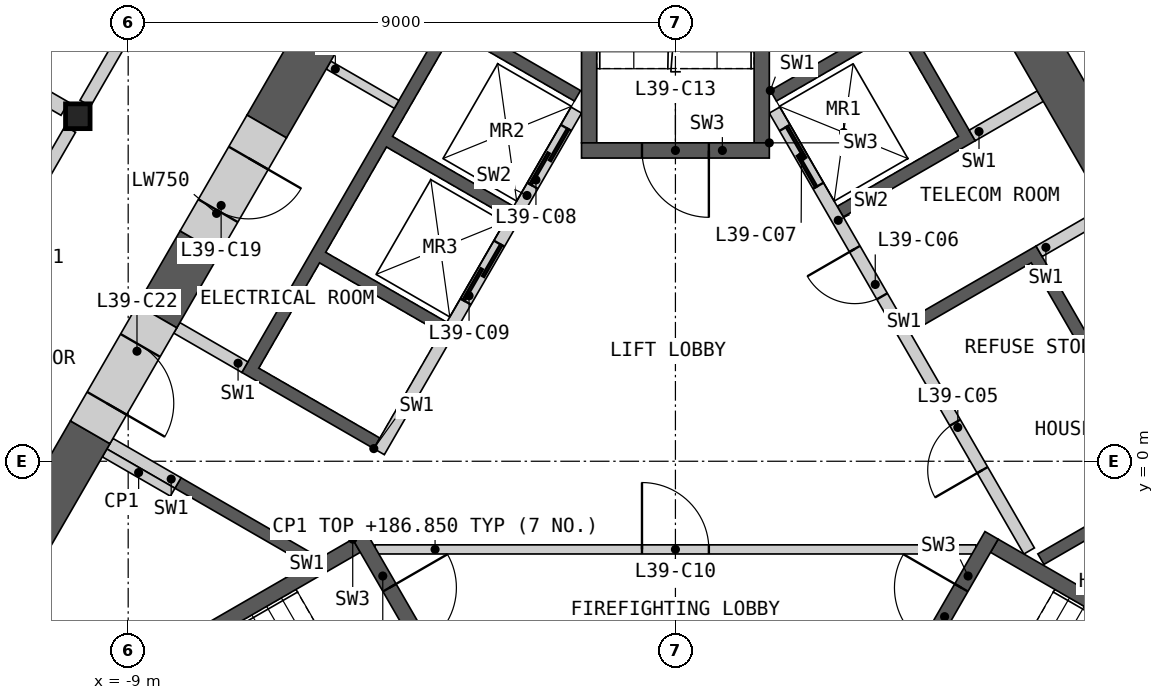
"""IFC4 building model, lengths in metres.
Left out: names, types, materials, properties, quantities, classifications, styles, units other than length and angle.
Written with IfcOpenShell. Run it as: python <this file> out.ifc"""

import sys

from ifc_helpers import new_model, si_unit, direction, frame, frame_2d, origin, origin_2d, place, context, subcontext, project, spatial, polyline, rectangle, i_section, outline, extrude, element, fill, save


model = new_model("IFC4")
c1 = context("Model", 3, precision=1e-05, world=origin(), true_north=direction((0.0, 1.0)))
c2 = subcontext(c1, "Body", "Model", "MODEL_VIEW")
j1 = project(units=[si_unit("LENGTHUNIT", "METRE"), si_unit("PLANEANGLEUNIT", "RADIAN")], contexts=[c1])
p1 = place(None, origin())
s1 = spatial("IfcSite", under=j1, at=p1, CompositionType="ELEMENT")
p2 = place(p1, origin())
s2 = spatial("IfcBuilding", under=s1, at=p2, CompositionType="ELEMENT")
p3 = place(p2, frame((0.0, 0.0, 183.6)))
s3 = spatial("IfcBuildingStorey", under=s2, at=p3, CompositionType="ELEMENT", Elevation=183.6)
p4 = place(p3, frame((-9.828, 5.675, 0.0), z_axis=(0.0, 0.0, 1.0), x_axis=(1.0, 0.0, 0.0)))
e1 = element("IfcColumn", 1, at=p4, inside=s3, PredefinedType="COLUMN", context=c2, shape_type="SweptSolid", body=[
    extrude(i_section(OverallWidth=0.404, OverallDepth=0.407, WebThickness=0.027, FlangeThickness=0.044, at=origin_2d()), origin(), (0.0, 0.0, 1.0), 3.6),
])
p5 = place(p3, origin())
e2 = element("IfcWall", 2, at=p5, inside=s3, PredefinedType="SHEAR", context=c2, shape_type="SweptSolid", body=[
    extrude(outline(polyline([(1.561, 6.097), (3.731, 7.35), (4.931, 5.272), (2.76, 4.019), (2.66, 4.192), (4.652, 5.342), (3.652, 7.074), (1.66, 5.924), (1.561, 6.097)])), origin(), (0.0, 0.0, 1.0), 3.25),
])
p6 = place(p3, origin())
e3 = element("IfcWall", 3, at=p6, inside=s3, PredefinedType="SHEAR", context=c2, shape_type="SweptSolid", body=[
    extrude(outline(polyline([(3.76, 2.287), (5.931, 3.54), (8.231, -0.444), (6.061, -1.697), (5.96, -1.524), (7.952, -0.374), (5.852, 3.263), (3.861, 2.113), (3.76, 2.287)])), origin(), (0.0, 0.0, 1.0), 3.25),
])
p7 = place(p3, frame((5.817, -1.476, 0.0), z_axis=(0.0, 0.0, 1.0), x_axis=(-0.500002616675, 0.866023893041, 0.0)))
e4 = element("IfcWall", 4, at=p7, inside=s3, PredefinedType="SOLIDWALL", context=c2, shape_type="SweptSolid", body=[
    extrude(rectangle(XDim=8.373, YDim=0.2, at=frame_2d((4.187, 0.0))), origin(), (0.0, 0.0, 1.0), 3.25),
])
p8 = place(p7, frame((1.537, 0.0, 0.0)))
e5 = element("IfcOpeningElement", 5, at=p8, cuts=e4, PredefinedType="OPENING", context=c2, shape_type="SweptSolid", body=[
    extrude(rectangle(XDim=0.9, YDim=2.1, at=frame_2d((0.45, 1.05))), frame((0.0, 0.11, 0.0), z_axis=(0.0, -1.0, 0.0), x_axis=(1.0, 0.0, 0.0)), (0.0, 0.0, 1.0), 0.22),
])
p9 = place(p7, frame((4.837, 0.0, 0.0)))
e6 = element("IfcOpeningElement", 6, at=p9, cuts=e4, PredefinedType="OPENING", context=c2, shape_type="SweptSolid", body=[
    extrude(rectangle(XDim=0.9, YDim=2.1, at=frame_2d((0.45, 1.05))), frame((0.0, 0.11, 0.0), z_axis=(0.0, -1.0, 0.0), x_axis=(1.0, 0.0, 0.0)), (0.0, 0.0, 1.0), 0.22),
])
p10 = place(p7, frame((6.937, 0.0, 0.0)))
e7 = element("IfcOpeningElement", 7, at=p10, cuts=e4, PredefinedType="OPENING", context=c2, shape_type="SweptSolid", body=[
    extrude(rectangle(XDim=1.1, YDim=2.1, at=frame_2d((0.55, 1.05))), frame((0.0, 0.11, 0.0), z_axis=(0.0, -1.0, 0.0), x_axis=(1.0, 0.0, 0.0)), (0.0, 0.0, 1.0), 0.22),
])
p11 = place(p3, frame((5.981, 3.453, 0.0), z_axis=(0.0, 0.0, 1.0), x_axis=(0.865968639725, 0.500098305348, 0.0)))
e8 = element("IfcWall", 8, at=p11, inside=s3, PredefinedType="SHEAR", context=c2, shape_type="SweptSolid", body=[
    extrude(rectangle(XDim=1.293, YDim=0.2, at=frame_2d((0.646, 0.0))), origin(), (0.0, 0.0, 1.0), 3.25),
])
p12 = place(p3, frame((4.881, 5.358, 0.0), z_axis=(0.0, 0.0, 1.0), x_axis=(0.866084958089, 0.499896834728, 0.0)))
e9 = element("IfcWall", 9, at=p12, inside=s3, PredefinedType="SHEAR", context=c2, shape_type="SweptSolid", body=[
    extrude(rectangle(XDim=1.293, YDim=0.2, at=frame_2d((0.646, 0.0))), origin(), (0.0, 0.0, 1.0), 3.25),
])
p13 = place(p3, origin())
e10 = element("IfcWall", 10, at=p13, inside=s3, PredefinedType="SHEAR", context=c2, shape_type="SweptSolid", body=[
    extrude(outline(polyline([(-6.061, -1.697), (-8.231, -0.444), (-8.131, -0.271), (-5.96, -1.524), (-6.061, -1.697)])), origin(), (0.0, 0.0, 1.0), 3.25),
])
p14 = place(p3, origin())
e11 = element("IfcWall", 11, at=p14, inside=s3, PredefinedType="SHEAR", context=c2, shape_type="SweptSolid", body=[
    extrude(outline(polyline([(-4.96, 0.208), (-7.131, 1.461), (-3.731, 7.35), (-1.561, 6.097), (-1.66, 5.924), (-3.652, 7.074), (-4.652, 5.342), (-2.66, 4.192), (-2.76, 4.019), (-4.752, 5.169), (-5.752, 3.437), (-3.76, 2.287), (-3.861, 2.113), (-5.852, 3.263), (-6.852, 1.531), (-4.861, 0.381), (-4.96, 0.208)])), origin(), (0.0, 0.0, 1.0), 3.25),
])
p15 = place(p3, frame((-1.631, 5.776, 0.0), z_axis=(0.0, 0.0, 1.0), x_axis=(-0.499992876559, -0.866029516466, 0.0)))
e12 = element("IfcWall", 12, at=p15, inside=s3, PredefinedType="SOLIDWALL", context=c2, shape_type="SweptSolid", body=[
    extrude(rectangle(XDim=6.486, YDim=0.2, at=frame_2d((3.243, 0.0))), origin(), (0.0, 0.0, 1.0), 3.25),
])
p16 = place(p15, frame((0.337, 0.0, 0.0)))
e13 = element("IfcOpeningElement", 13, at=p16, cuts=e12, PredefinedType="OPENING", context=c2, shape_type="SweptSolid", body=[
    extrude(rectangle(XDim=1.1, YDim=2.1, at=frame_2d((0.55, 1.05))), frame((0.0, 0.11, 0.0), z_axis=(0.0, -1.0, 0.0), x_axis=(1.0, 0.0, 0.0)), (0.0, 0.0, 1.0), 0.22),
])
p17 = place(p15, frame((2.537, 0.0, 0.0)))
e14 = element("IfcOpeningElement", 14, at=p17, cuts=e12, PredefinedType="OPENING", context=c2, shape_type="SweptSolid", body=[
    extrude(rectangle(XDim=1.1, YDim=2.1, at=frame_2d((0.55, 1.05))), frame((0.0, 0.11, 0.0), z_axis=(0.0, -1.0, 0.0), x_axis=(1.0, 0.0, 0.0)), (0.0, 0.0, 1.0), 0.22),
])
for number, where, z_axis, x_axis in (
    (15, (-7.081, 1.548, 0.0), (0.0, 0.0, 1.0), (-0.866, 0.5, 0.0)),
    (16, (-8.181, -0.357, 0.0), (0.0, 0.0, 1.0), (-0.866, 0.5, 0.0)),
):
    element("IfcWall", number, at=place(p3, frame(where, z_axis=z_axis, x_axis=x_axis)), inside=s3, PredefinedType="SHEAR", context=c2, shape_type="SweptSolid", body=[
        extrude(rectangle(XDim=1.293, YDim=0.2, at=frame_2d((0.646, 0.0))), origin(), (0.0, 0.0, 1.0), 3.25),
    ])
p18 = place(p3, frame((-4.941, -1.45, 0.0), z_axis=(0.0, 0.0, 1.0), x_axis=(1.0, 0.0, 0.0)))
e17 = element("IfcWall", 17, at=p18, inside=s3, PredefinedType="PARTITIONING", context=c2, shape_type="SweptSolid", body=[
    extrude(rectangle(XDim=9.882, YDim=0.15, at=frame_2d((4.941, 0.0))), origin(), (0.0, 0.0, 1.0), 3.25),
])
p19 = place(p18, frame((4.391, 0.0, 0.0)))
e18 = element("IfcOpeningElement", 18, at=p19, cuts=e17, PredefinedType="OPENING", context=c2, shape_type="SweptSolid", body=[
    extrude(rectangle(XDim=1.1, YDim=2.1, at=frame_2d((0.55, 1.05))), frame((0.0, 0.085, 0.0), z_axis=(0.0, -1.0, 0.0), x_axis=(1.0, 0.0, 0.0)), (0.0, 0.0, 1.0), 0.17),
])
p20 = place(p3, origin())
e19 = element("IfcWall", 19, at=p20, inside=s3, PredefinedType="SHEAR", context=c2, shape_type="SweptSolid", body=[
    extrude(outline(polyline([(-5.307, -1.281), (-10.374, -4.206), (-10.032, -4.298), (-5.182, -1.498), (-5.307, -1.281)])), origin(), (0.0, 0.0, 1.0), 3.25),
])
p21 = place(p3, frame((-5.199, -1.219, 0.0), z_axis=(0.0, 0.0, 1.0), x_axis=(0.499982516597, -0.866035497597, 0.0)))
e20 = element("IfcWall", 20, at=p21, inside=s3, PredefinedType="SHEAR", context=c2, shape_type="SweptSolid", body=[
    extrude(rectangle(XDim=3.088, YDim=0.25, at=frame_2d((1.544, 0.0))), origin(), (0.0, 0.0, 1.0), 3.25),
])
p22 = place(p21, frame((0.994, 0.0, 0.0)))
e21 = element("IfcOpeningElement", 21, at=p22, cuts=e20, PredefinedType="OPENING", context=c2, shape_type="SweptSolid", body=[
    extrude(rectangle(XDim=1.1, YDim=2.1, at=frame_2d((0.55, 1.05))), frame((0.0, 0.135, 0.0), z_axis=(0.0, -1.0, 0.0), x_axis=(1.0, 0.0, 0.0)), (0.0, 0.0, 1.0), 0.27),
])
p23 = place(p3, origin())
e22 = element("IfcWall", 22, at=p23, inside=s3, PredefinedType="SHEAR", context=c2, shape_type="SweptSolid", body=[
    extrude(outline(polyline([(10.032, -4.298), (10.374, -4.206), (5.307, -1.281), (5.182, -1.498), (10.032, -4.298)])), origin(), (0.0, 0.0, 1.0), 3.25),
])
p24 = place(p3, frame((3.655, -3.893, 0.0), z_axis=(0.0, 0.0, 1.0), x_axis=(0.499982516597, 0.866035497597, 0.0)))
e23 = element("IfcWall", 23, at=p24, inside=s3, PredefinedType="SHEAR", context=c2, shape_type="SweptSolid", body=[
    extrude(rectangle(XDim=3.088, YDim=0.25, at=frame_2d((1.544, 0.0))), origin(), (0.0, 0.0, 1.0), 3.25),
])
p25 = place(p24, frame((0.994, 0.0, 0.0)))
e24 = element("IfcOpeningElement", 24, at=p25, cuts=e23, PredefinedType="OPENING", context=c2, shape_type="SweptSolid", body=[
    extrude(rectangle(XDim=1.1, YDim=2.1, at=frame_2d((0.55, 1.05))), frame((0.0, 0.135, 0.0), z_axis=(0.0, -1.0, 0.0), x_axis=(1.0, 0.0, 0.0)), (0.0, 0.0, 1.0), 0.27),
])
p26 = place(p3, origin())
e25 = element("IfcWall", 25, at=p26, inside=s3, PredefinedType="SHEAR", context=c2, shape_type="SweptSolid", body=[
    extrude(outline(polyline([(1.544, 5.237), (1.544, 11.087), (1.294, 10.837), (1.294, 5.237), (1.544, 5.237)])), origin(), (0.0, 0.0, 1.0), 3.25),
])
p27 = place(p3, origin())
e26 = element("IfcWall", 26, at=p27, inside=s3, PredefinedType="SHEAR", context=c2, shape_type="SweptSolid", body=[
    extrude(outline(polyline([(-1.294, 10.837), (-1.544, 11.087), (-1.544, 5.237), (-1.294, 5.237), (-1.294, 10.837)])), origin(), (0.0, 0.0, 1.0), 3.25),
])
p28 = place(p3, frame((1.544, 5.112, 0.0), z_axis=(0.0, 0.0, 1.0), x_axis=(-1.0, 0.0, 0.0)))
e27 = element("IfcWall", 27, at=p28, inside=s3, PredefinedType="SHEAR", context=c2, shape_type="SweptSolid", body=[
    extrude(rectangle(XDim=3.088, YDim=0.25, at=frame_2d((1.544, 0.0))), origin(), (0.0, 0.0, 1.0), 3.25),
])
p29 = place(p28, frame((0.994, 0.0, 0.0)))
e28 = element("IfcOpeningElement", 28, at=p29, cuts=e27, PredefinedType="OPENING", context=c2, shape_type="SweptSolid", body=[
    extrude(rectangle(XDim=1.1, YDim=2.1, at=frame_2d((0.55, 1.05))), frame((0.0, 0.135, 0.0), z_axis=(0.0, -1.0, 0.0), x_axis=(1.0, 0.0, 0.0)), (0.0, 0.0, 1.0), 0.27),
])
for number, where, z_axis, x_axis in (
    (29, (-8.268, -0.509, 0.0), (0.0, 0.0, 1.0), (-0.866, 0.5, 0.0)),
    (30, (-5.705, 6.516, 0.0), (0.0, 0.0, 1.0), (0.866, -0.5, 0.0)),
):
    element("IfcWall", number, at=place(p3, frame(where, z_axis=z_axis, x_axis=x_axis)), inside=s3, PredefinedType="PARTITIONING", context=c2, shape_type="SweptSolid", body=[
        extrude(rectangle(XDim=1.293, YDim=0.15, at=frame_2d((0.646, 0.0))), origin(), (0.0, 0.0, 1.0), 3.25),
    ])
p30 = place(p3, frame((7.964, 3.354, 0.0), z_axis=(0.0, 0.0, 1.0), x_axis=(-0.50002928721, 0.866008494146, 0.0)))
e31 = element("IfcWall", 31, at=p30, inside=s3, PredefinedType="SHEAR", context=c2, shape_type="SweptSolid", body=[
    extrude(rectangle(XDim=6.405, YDim=0.75, at=frame_2d((3.203, 0.0))), origin(), (0.0, 0.0, 1.0), 3.25),
])
p31 = place(p3, frame((-9.625, 0.477, 0.0), z_axis=(0.0, 0.0, 1.0), x_axis=(-0.499986234705, -0.866033351035, 0.0)))
e32 = element("IfcWall", 32, at=p31, inside=s3, PredefinedType="SHEAR", context=c2, shape_type="SweptSolid", body=[
    extrude(rectangle(XDim=9.801, YDim=0.75, at=frame_2d((4.9, 0.0))), origin(), (0.0, 0.0, 1.0), 3.25),
])
p32 = place(p3, frame((-2.622, 12.606, 0.0), z_axis=(0.0, 0.0, 1.0), x_axis=(-0.500014611105, -0.866016967894, 0.0)))
e33 = element("IfcWall", 33, at=p32, inside=s3, PredefinedType="SHEAR", context=c2, shape_type="SweptSolid", body=[
    extrude(rectangle(XDim=8.198, YDim=0.75, at=frame_2d((4.099, 0.0))), origin(), (0.0, 0.0, 1.0), 3.25),
])
p33 = place(p3, frame((-7.821, 3.601, 0.0), z_axis=(0.0, 0.0, 1.0), x_axis=(-0.49996263964, -0.866046972724, 0.0)))
e34 = element("IfcWall", 34, at=p33, inside=s3, PredefinedType="SHEAR", context=c2, shape_type="SweptSolid", body=[
    extrude(rectangle(XDim=1.408, YDim=0.75, at=frame_2d((0.704, 0.0))), origin(), (0.0, 0.0, 1.0), 3.25),
])
p34 = place(p3, frame((-6.721, 5.506, 0.0), z_axis=(0.0, 0.0, 1.0), x_axis=(-0.499946605688, -0.86605622881, 0.0)))
e35 = element("IfcWall", 35, at=p34, inside=s3, PredefinedType="SHEAR", context=c2, shape_type="SweptSolid", body=[
    extrude(rectangle(XDim=2.2, YDim=0.75, at=frame_2d((1.1, 0.0))), origin(), (0.0, 0.0, 1.0), 3.25),
])
p35 = place(p34, frame((0.6, 0.0, 0.0)))
e36 = element("IfcOpeningElement", 36, at=p35, cuts=e35, PredefinedType="OPENING", context=c2, shape_type="SweptSolid", body=[
    extrude(rectangle(XDim=1.0, YDim=2.1, at=frame_2d((0.5, 1.05))), frame((0.0, 0.385, 0.0), z_axis=(0.0, -1.0, 0.0), x_axis=(1.0, 0.0, 0.0)), (0.0, 0.0, 1.0), 0.77),
])
p36 = place(p3, frame((-8.525, 2.382, 0.0), z_axis=(0.0, 0.0, 1.0), x_axis=(-0.500077893725, -0.86598042715, 0.0)))
e37 = element("IfcWall", 37, at=p36, inside=s3, PredefinedType="SHEAR", context=c2, shape_type="SweptSolid", body=[
    extrude(rectangle(XDim=2.2, YDim=0.75, at=frame_2d((1.1, 0.0))), origin(), (0.0, 0.0, 1.0), 3.25),
])
p37 = place(p36, frame((0.55, 0.0, 0.0)))
e38 = element("IfcOpeningElement", 38, at=p37, cuts=e37, PredefinedType="OPENING", context=c2, shape_type="SweptSolid", body=[
    extrude(rectangle(XDim=1.1, YDim=2.1, at=frame_2d((0.55, 1.05))), frame((0.0, 0.385, 0.0), z_axis=(0.0, -1.0, 0.0), x_axis=(1.0, 0.0, 0.0)), (0.0, 0.0, 1.0), 0.77),
])
p38 = place(p3, frame((5.377, 19.385, 0.0), z_axis=(0.0, 0.0, 1.0), x_axis=(0.500000757641, -0.86602496636, 0.0)))
e39 = element("IfcWall", 39, at=p38, inside=s3, PredefinedType="PARTITIONING", context=c2, shape_type="SweptSolid", body=[
    extrude(rectangle(XDim=28.198, YDim=0.2, at=frame_2d((14.099, 0.0))), origin(), (0.0, 0.0, 1.0), 3.25),
])
p39 = place(p38, frame((22.735, 0.0, 0.0)))
e40 = element("IfcOpeningElement", 40, at=p39, cuts=e39, PredefinedType="OPENING", context=c2, shape_type="SweptSolid", body=[
    extrude(rectangle(XDim=1.8, YDim=2.1, at=frame_2d((0.9, 1.05))), frame((0.0, 0.11, 0.0), z_axis=(0.0, -1.0, 0.0), x_axis=(1.0, 0.0, 0.0)), (0.0, 0.0, 1.0), 0.22),
])
p40 = place(p38, frame((14.402, 0.0, 0.0)))
e41 = element("IfcOpeningElement", 41, at=p40, cuts=e39, PredefinedType="OPENING", context=c2, shape_type="SweptSolid", body=[
    extrude(rectangle(XDim=1.0, YDim=2.1, at=frame_2d((0.5, 1.05))), frame((0.0, 0.11, 0.0), z_axis=(0.0, -1.0, 0.0), x_axis=(1.0, 0.0, 0.0)), (0.0, 0.0, 1.0), 0.22),
])
p41 = place(p38, frame((12.796, 0.0, 0.0)))
e42 = element("IfcOpeningElement", 42, at=p41, cuts=e39, PredefinedType="OPENING", context=c2, shape_type="SweptSolid", body=[
    extrude(rectangle(XDim=1.0, YDim=2.1, at=frame_2d((0.5, 1.05))), frame((0.0, 0.11, 0.0), z_axis=(0.0, -1.0, 0.0), x_axis=(1.0, 0.0, 0.0)), (0.0, 0.0, 1.0), 0.22),
])
p42 = place(p38, frame((4.164, 0.0, 0.0)))
e43 = element("IfcOpeningElement", 43, at=p42, cuts=e39, PredefinedType="OPENING", context=c2, shape_type="SweptSolid", body=[
    extrude(rectangle(XDim=1.0, YDim=2.1, at=frame_2d((0.5, 1.05))), frame((0.0, 0.11, 0.0), z_axis=(0.0, -1.0, 0.0), x_axis=(1.0, 0.0, 0.0)), (0.0, 0.0, 1.0), 0.22),
])
p43 = place(p38, frame((1.452, 0.0, 0.0)))
e44 = element("IfcOpeningElement", 44, at=p43, cuts=e39, PredefinedType="OPENING", context=c2, shape_type="SweptSolid", body=[
    extrude(rectangle(XDim=0.95, YDim=2.1, at=frame_2d((0.475, 1.05))), frame((0.0, 0.11, 0.0), z_axis=(0.0, -1.0, 0.0), x_axis=(1.0, 0.0, 0.0)), (0.0, 0.0, 1.0), 0.22),
])
p44 = place(p3, frame((-21.0, 12.124, 0.0), z_axis=(0.0, 0.0, 1.0), x_axis=(0.866025883649, -0.499999168849, 0.0)))
e45 = element("IfcWall", 45, at=p44, inside=s3, PredefinedType="PARTITIONING", context=c2, shape_type="SweptSolid", body=[
    extrude(rectangle(XDim=12.652, YDim=0.25, at=frame_2d((6.326, 0.0))), origin(), (0.0, 0.0, 1.0), 2.404),
])
p45 = place(p3, frame((-9.705, 5.888, 0.0), z_axis=(0.0, 0.0, 1.0), x_axis=(0.50000393355, 0.866023132736, 0.0)))
e46 = element("IfcWall", 46, at=p45, inside=s3, PredefinedType="PARTITIONING", context=c2, shape_type="SweptSolid", body=[
    extrude(rectangle(XDim=9.335, YDim=0.2, at=frame_2d((4.667, 0.0))), origin(), (0.0, 0.0, 1.0), 3.25),
])
p46 = place(p45, frame((5.172, 0.0, 0.0)))
e47 = element("IfcOpeningElement", 47, at=p46, cuts=e46, PredefinedType="OPENING", context=c2, shape_type="SweptSolid", body=[
    extrude(rectangle(XDim=1.0, YDim=2.1, at=frame_2d((0.5, 1.05))), frame((0.0, 0.11, 0.0), z_axis=(0.0, -1.0, 0.0), x_axis=(1.0, 0.0, 0.0)), (0.0, 0.0, 1.0), 0.22),
])
p47 = place(p45, frame((3.565, 0.0, 0.0)))
e48 = element("IfcOpeningElement", 48, at=p47, cuts=e46, PredefinedType="OPENING", context=c2, shape_type="SweptSolid", body=[
    extrude(rectangle(XDim=1.0, YDim=2.1, at=frame_2d((0.5, 1.05))), frame((0.0, 0.11, 0.0), z_axis=(0.0, -1.0, 0.0), x_axis=(1.0, 0.0, 0.0)), (0.0, 0.0, 1.0), 0.22),
])
p48 = place(p3, frame((-14.619, -2.624, 0.0), z_axis=(0.0, 0.0, 1.0), x_axis=(0.50000393355, 0.866023132736, 0.0)))
e49 = element("IfcWall", 49, at=p48, inside=s3, PredefinedType="PARTITIONING", context=c2, shape_type="SweptSolid", body=[
    extrude(rectangle(XDim=9.335, YDim=0.2, at=frame_2d((4.667, 0.0))), origin(), (0.0, 0.0, 1.0), 3.25),
])
p49 = place(p48, frame((4.77, 0.0, 0.0)))
e50 = element("IfcOpeningElement", 50, at=p49, cuts=e49, PredefinedType="OPENING", context=c2, shape_type="SweptSolid", body=[
    extrude(rectangle(XDim=1.0, YDim=2.1, at=frame_2d((0.5, 1.05))), frame((0.0, 0.11, 0.0), z_axis=(0.0, -1.0, 0.0), x_axis=(1.0, 0.0, 0.0)), (0.0, 0.0, 1.0), 0.22),
])
p50 = place(p48, frame((3.163, 0.0, 0.0)))
e51 = element("IfcOpeningElement", 51, at=p50, cuts=e49, PredefinedType="OPENING", context=c2, shape_type="SweptSolid", body=[
    extrude(rectangle(XDim=1.0, YDim=2.1, at=frame_2d((0.5, 1.05))), frame((0.0, 0.11, 0.0), z_axis=(0.0, -1.0, 0.0), x_axis=(1.0, 0.0, 0.0)), (0.0, 0.0, 1.0), 0.22),
])
p51 = place(p8, origin())
e52 = element("IfcDoor", 52, at=p51, inside=s3, OperationType="SINGLE_SWING_LEFT", PredefinedType="DOOR", context=c2, shape_type="SweptSolid", body=[
    extrude(rectangle(XDim=0.9, YDim=2.1, at=frame_2d((0.45, 1.05))), frame((0.0, 0.025, 0.0), z_axis=(0.0, -1.0, 0.0), x_axis=(1.0, 0.0, 0.0)), (0.0, 0.0, 1.0), 0.05),
])
fill(e5, e52)
p52 = place(p9, origin())
e53 = element("IfcDoor", 53, at=p52, inside=s3, OperationType="SINGLE_SWING_RIGHT", PredefinedType="DOOR", context=c2, shape_type="SweptSolid", body=[
    extrude(rectangle(XDim=0.9, YDim=2.1, at=frame_2d((0.45, 1.05))), frame((0.0, 0.025, 0.0), z_axis=(0.0, -1.0, 0.0), x_axis=(1.0, 0.0, 0.0)), (0.0, 0.0, 1.0), 0.05),
])
fill(e6, e53)
p53 = place(p10, origin())
e54 = element("IfcDoor", 54, at=p53, inside=s3, OperationType="SLIDING_TO_LEFT", PredefinedType="DOOR", context=c2, shape_type="SweptSolid", body=[
    extrude(rectangle(XDim=1.1, YDim=2.1, at=frame_2d((0.55, 1.05))), frame((0.0, 0.025, 0.0), z_axis=(0.0, -1.0, 0.0), x_axis=(1.0, 0.0, 0.0)), (0.0, 0.0, 1.0), 0.05),
])
fill(e7, e54)
p54 = place(p16, origin())
e55 = element("IfcDoor", 55, at=p54, inside=s3, OperationType="SLIDING_TO_LEFT", PredefinedType="DOOR", context=c2, shape_type="SweptSolid", body=[
    extrude(rectangle(XDim=1.1, YDim=2.1, at=frame_2d((0.55, 1.05))), frame((0.0, 0.025, 0.0), z_axis=(0.0, -1.0, 0.0), x_axis=(1.0, 0.0, 0.0)), (0.0, 0.0, 1.0), 0.05),
])
fill(e13, e55)
p55 = place(p17, origin())
e56 = element("IfcDoor", 56, at=p55, inside=s3, OperationType="SLIDING_TO_LEFT", PredefinedType="DOOR", context=c2, shape_type="SweptSolid", body=[
    extrude(rectangle(XDim=1.1, YDim=2.1, at=frame_2d((0.55, 1.05))), frame((0.0, 0.025, 0.0), z_axis=(0.0, -1.0, 0.0), x_axis=(1.0, 0.0, 0.0)), (0.0, 0.0, 1.0), 0.05),
])
fill(e14, e56)
p56 = place(p19, origin())
e57 = element("IfcDoor", 57, at=p56, inside=s3, OperationType="SINGLE_SWING_LEFT", PredefinedType="DOOR", context=c2, shape_type="SweptSolid", body=[
    extrude(rectangle(XDim=1.1, YDim=2.1, at=frame_2d((0.55, 1.05))), frame((0.0, 0.025, 0.0), z_axis=(0.0, -1.0, 0.0), x_axis=(1.0, 0.0, 0.0)), (0.0, 0.0, 1.0), 0.05),
])
fill(e18, e57)
p57 = place(p22, origin())
e58 = element("IfcDoor", 58, at=p57, inside=s3, OperationType="SINGLE_SWING_LEFT", PredefinedType="DOOR", context=c2, shape_type="SweptSolid", body=[
    extrude(rectangle(XDim=1.1, YDim=2.1, at=frame_2d((0.55, 1.05))), frame((0.0, 0.025, 0.0), z_axis=(0.0, -1.0, 0.0), x_axis=(1.0, 0.0, 0.0)), (0.0, 0.0, 1.0), 0.05),
])
fill(e21, e58)
p58 = place(p25, origin())
e59 = element("IfcDoor", 59, at=p58, inside=s3, OperationType="SINGLE_SWING_RIGHT", PredefinedType="DOOR", context=c2, shape_type="SweptSolid", body=[
    extrude(rectangle(XDim=1.1, YDim=2.1, at=frame_2d((0.55, 1.05))), frame((0.0, 0.025, 0.0), z_axis=(0.0, -1.0, 0.0), x_axis=(1.0, 0.0, 0.0)), (0.0, 0.0, 1.0), 0.05),
])
fill(e24, e59)
p59 = place(p29, origin())
e60 = element("IfcDoor", 60, at=p59, inside=s3, OperationType="SINGLE_SWING_LEFT", PredefinedType="DOOR", context=c2, shape_type="SweptSolid", body=[
    extrude(rectangle(XDim=1.1, YDim=2.1, at=frame_2d((0.55, 1.05))), frame((0.0, 0.025, 0.0), z_axis=(0.0, -1.0, 0.0), x_axis=(1.0, 0.0, 0.0)), (0.0, 0.0, 1.0), 0.05),
])
fill(e28, e60)
p60 = place(p35, origin())
e61 = element("IfcDoor", 61, at=p60, inside=s3, OperationType="SINGLE_SWING_LEFT", PredefinedType="DOOR", context=c2, shape_type="SweptSolid", body=[
    extrude(rectangle(XDim=1.0, YDim=2.1, at=frame_2d((0.5, 1.05))), frame((0.0, 0.13, 0.0), z_axis=(0.0, -1.0, 0.0), x_axis=(1.0, 0.0, 0.0)), (0.0, 0.0, 1.0), 0.05),
])
fill(e36, e61)
p61 = place(p37, origin())
e62 = element("IfcDoor", 62, at=p61, inside=s3, OperationType="SINGLE_SWING_RIGHT", PredefinedType="DOOR", context=c2, shape_type="SweptSolid", body=[
    extrude(rectangle(XDim=1.1, YDim=2.1, at=frame_2d((0.55, 1.05))), frame((0.0, 0.13, 0.0), z_axis=(0.0, -1.0, 0.0), x_axis=(1.0, 0.0, 0.0)), (0.0, 0.0, 1.0), 0.05),
])
fill(e38, e62)
save(model, sys.argv[1])
